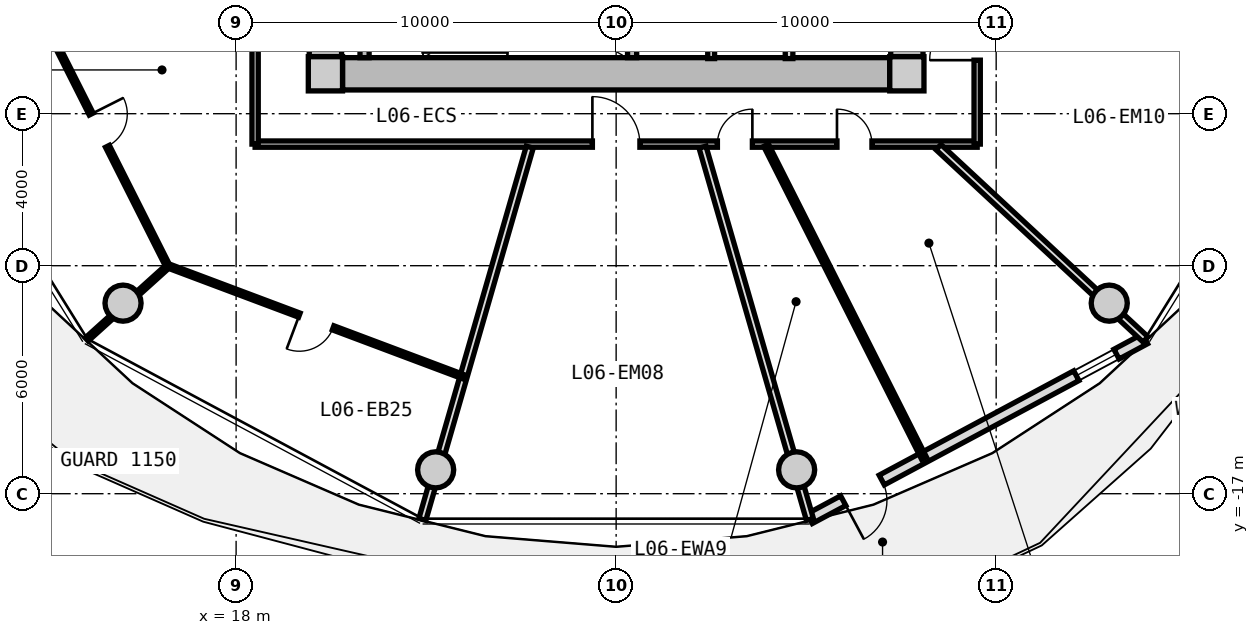
"""IFC4 building model, lengths in metres.
Left out: names, types, materials, properties, quantities, classifications, styles, units other than length and angle.
Written with IfcOpenShell. Run it as: python <this file> out.ifc"""

import sys

from ifc_helpers import new_model, si_unit, direction, frame, frame_2d, origin, origin_2d, place, context, subcontext, project, spatial, rectangle, circle, extrude, source, transform, mapped, element, fill, save


model = new_model("IFC4")
c1 = context("Model", 3, precision=1e-05, world=origin(), true_north=direction((0.0, 1.0)))
c2 = subcontext(c1, "Body", "Model", "MODEL_VIEW")
j1 = project(units=[si_unit("LENGTHUNIT", "METRE"), si_unit("PLANEANGLEUNIT", "RADIAN")], contexts=[c1])
p1 = place(None, origin())
s1 = spatial("IfcSite", under=j1, at=p1, CompositionType="ELEMENT")
p2 = place(p1, origin())
s2 = spatial("IfcBuilding", under=s1, at=p2, CompositionType="ELEMENT")
p3 = place(p2, frame((0.0, 0.0, 24.65)))
s3 = spatial("IfcBuildingStorey", under=s2, at=p3, CompositionType="ELEMENT", Elevation=24.65)
m1 = source(origin(), c2, "Body", "SweptSolid", [
    extrude(rectangle(XDim=0.9, YDim=0.9, at=origin_2d()), origin(), (0.0, 0.0, 1.0), 3.05),
])
for number, where, z_axis, x_axis in (
    (1, (20.35, -5.95, 0.0), (0.0, 0.0, 1.0), (1.0, 0.0, 0.0)),
    (2, (35.65, -5.95, 0.0), (0.0, 0.0, 1.0), (1.0, 0.0, 0.0)),
):
    element("IfcColumn", number, at=place(p3, frame(where, z_axis=z_axis, x_axis=x_axis)), inside=s3, PredefinedType="COLUMN", context=c2, shape_type="MappedRepresentation", body=[
        mapped(m1, transform((0.0, 0.0, 0.0), x_axis=(1.0, 0.0, 0.0), y_axis=(0.0, 1.0, 0.0), z_axis=(0.0, 0.0, 1.0), scale=1.0)),
    ])
m2 = source(origin(), c2, "Body", "SweptSolid", [
    extrude(rectangle(XDim=14.4, YDim=0.85, at=frame_2d((7.2, 0.0))), origin(), (0.0, 0.0, 1.0), 2.79),
])
p4 = place(p3, frame((35.2, -5.95, 0.0), z_axis=(0.0, 0.0, 1.0), x_axis=(-1.0, 0.0, 0.0)))
e3 = element("IfcWall", 3, at=p4, inside=s3, PredefinedType="SHEAR", context=c2, shape_type="MappedRepresentation", body=[
    mapped(m2, transform((0.0, 0.0, 0.0), x_axis=(1.0, 0.0, 0.0), y_axis=(0.0, 1.0, 0.0), z_axis=(0.0, 0.0, 1.0), scale=1.0)),
])
m3 = source(origin(), c2, "Body", "SweptSolid", [
    extrude(rectangle(XDim=11.0, YDim=0.85, at=frame_2d((5.5, 0.0))), origin(), (0.0, 0.0, 1.0), 2.79),
])
p5 = place(p3, frame((20.35, -5.5, 0.0), z_axis=(0.0, 0.0, 1.0), x_axis=(0.0, 1.0, 0.0)))
e4 = element("IfcWall", 4, at=p5, inside=s3, PredefinedType="SHEAR", context=c2, shape_type="MappedRepresentation", body=[
    mapped(m3, transform((0.0, 0.0, 0.0), x_axis=(1.0, 0.0, 0.0), y_axis=(0.0, 1.0, 0.0), z_axis=(0.0, 0.0, 1.0), scale=1.0)),
])
p6 = place(p5, frame((3.8, 0.0, 0.0)))
e5 = element("IfcOpeningElement", 5, at=p6, cuts=e4, PredefinedType="OPENING", context=c2, shape_type="SweptSolid", body=[
    extrude(rectangle(XDim=1.2, YDim=2.15, at=frame_2d((0.6, 1.075))), frame((0.0, 0.435, 0.0), z_axis=(0.0, -1.0, 0.0), x_axis=(1.0, 0.0, 0.0)), (0.0, 0.0, 1.0), 0.87),
])
p7 = place(p3, frame((35.65, 5.5, 0.0), z_axis=(0.0, 0.0, 1.0), x_axis=(0.0, -1.0, 0.0)))
e6 = element("IfcWall", 6, at=p7, inside=s3, PredefinedType="SHEAR", context=c2, shape_type="MappedRepresentation", body=[
    mapped(m3, transform((0.0, 0.0, 0.0), x_axis=(1.0, 0.0, 0.0), y_axis=(0.0, 1.0, 0.0), z_axis=(0.0, 0.0, 1.0), scale=1.0)),
])
p8 = place(p7, frame((5.65, 0.0, 0.0)))
e7 = element("IfcOpeningElement", 7, at=p8, cuts=e6, PredefinedType="OPENING", context=c2, shape_type="SweptSolid", body=[
    extrude(rectangle(XDim=1.2, YDim=2.15, at=frame_2d((0.6, 1.075))), frame((0.0, 0.435, 0.0), z_axis=(0.0, -1.0, 0.0), x_axis=(1.0, 0.0, 0.0)), (0.0, 0.0, 1.0), 0.87),
])
m4 = source(origin(), c2, "Body", "SweptSolid", [
    extrude(circle(Radius=0.475, at=origin_2d()), origin(), (0.0, 0.0, 1.0), 3.05),
])
for number, where, z_axis, x_axis in (
    (8, (15.025, -11.985, 0.0), (0.0, 0.0, 1.0), (1.0, 0.0, 0.0)),
    (9, (23.251, -16.373, 0.0), (0.0, 0.0, 1.0), (1.0, 0.0, 0.0)),
    (10, (32.749, -16.373, 0.0), (0.0, 0.0, 1.0), (1.0, 0.0, 0.0)),
    (11, (40.975, -11.985, 0.0), (0.0, 0.0, 1.0), (1.0, 0.0, 0.0)),
):
    element("IfcColumn", number, at=place(p3, frame(where, z_axis=z_axis, x_axis=x_axis)), inside=s3, PredefinedType="COLUMN", context=c2, shape_type="MappedRepresentation", body=[
        mapped(m4, transform((0.0, 0.0, 0.0), x_axis=(1.0, 0.0, 0.0), y_axis=(0.0, 1.0, 0.0), z_axis=(0.0, 0.0, 1.0), scale=1.0)),
    ])
m5 = source(origin(), c2, "Body", "SweptSolid", [
    extrude(rectangle(XDim=10.011, YDim=0.29, at=frame_2d((5.005, 0.0))), origin(), (0.0, 0.0, 1.0), 2.79),
])
p9 = place(p3, frame((41.916, -12.926, 0.0), z_axis=(0.0, 0.0, 1.0), x_axis=(-0.881272505317, -0.472608475773, 0.0)))
e12 = element("IfcWall", 12, at=p9, inside=s3, PredefinedType="SOLIDWALL", context=c2, shape_type="MappedRepresentation", body=[
    mapped(m5, transform((0.0, 0.0, 0.0), x_axis=(1.0, 0.0, 0.0), y_axis=(0.0, 1.0, 0.0), z_axis=(0.0, 0.0, 1.0), scale=1.0)),
])
p10 = place(p9, frame((7.86, 0.0, 0.0)))
e13 = element("IfcOpeningElement", 13, at=p10, cuts=e12, PredefinedType="OPENING", context=c2, shape_type="SweptSolid", body=[
    extrude(rectangle(XDim=1.15, YDim=2.25, at=frame_2d((0.575, 1.125))), frame((0.0, 0.155, 0.0), z_axis=(0.0, -1.0, 0.0), x_axis=(1.0, 0.0, 0.0)), (0.0, 0.0, 1.0), 0.31),
])
p11 = place(p9, frame((0.85, 0.0, 0.85)))
e14 = element("IfcOpeningElement", 14, at=p11, cuts=e12, PredefinedType="OPENING", context=c2, shape_type="SweptSolid", body=[
    extrude(rectangle(XDim=1.2, YDim=1.5, at=frame_2d((0.6, 0.75))), frame((0.0, 0.155, 0.0), z_axis=(0.0, -1.0, 0.0), x_axis=(1.0, 0.0, 0.0)), (0.0, 0.0, 1.0), 0.31),
])
m6 = source(origin(), c2, "Body", "SweptSolid", [
    extrude(rectangle(XDim=3.075, YDim=0.24, at=frame_2d((1.538, 0.0))), origin(), (0.0, 0.0, 1.0), 2.79),
])
for number, where, z_axis, x_axis in (
    (15, (21.38, -5.525, 0.0), (0.0, 0.0, 1.0), (0.0, 1.0, 0.0)),
    (16, (28.42, -5.525, 0.0), (0.0, 0.0, 1.0), (0.0, 1.0, 0.0)),
):
    element("IfcWall", number, at=place(p3, frame(where, z_axis=z_axis, x_axis=x_axis)), inside=s3, PredefinedType="PARTITIONING", context=c2, shape_type="MappedRepresentation", body=[
        mapped(m6, transform((0.0, 0.0, 0.0), x_axis=(1.0, 0.0, 0.0), y_axis=(0.0, 1.0, 0.0), z_axis=(0.0, 0.0, 1.0), scale=1.0)),
    ])
m7 = source(origin(), c2, "Body", "SweptSolid", [
    extrude(rectangle(XDim=3.8, YDim=0.2, at=frame_2d((1.9, 0.0))), origin(), (0.0, 0.0, 1.0), 2.775),
])
p12 = place(p3, frame((32.55, -5.55, 0.0), z_axis=(0.0, 0.0, 1.0), x_axis=(0.0, 1.0, 0.0)))
e17 = element("IfcWall", 17, at=p12, inside=s3, PredefinedType="PARTITIONING", context=c2, shape_type="MappedRepresentation", body=[
    mapped(m7, transform((0.0, 0.0, 0.0), x_axis=(1.0, 0.0, 0.0), y_axis=(0.0, 1.0, 0.0), z_axis=(0.0, 0.0, 1.0), scale=1.0)),
])
m8 = source(origin(), c2, "Body", "SweptSolid", [
    extrude(rectangle(XDim=3.22, YDim=0.18, at=frame_2d((1.61, 0.0))), origin(), (0.0, 0.0, 1.0), 2.775),
])
p13 = place(p3, frame((30.5, -5.55, 0.0), z_axis=(0.0, 0.0, 1.0), x_axis=(0.0, 1.0, 0.0)))
e18 = element("IfcWall", 18, at=p13, inside=s3, PredefinedType="PARTITIONING", context=c2, shape_type="MappedRepresentation", body=[
    mapped(m8, transform((0.0, 0.0, 0.0), x_axis=(1.0, 0.0, 0.0), y_axis=(0.0, 1.0, 0.0), z_axis=(0.0, 0.0, 1.0), scale=1.0)),
])
m9 = source(origin(), c2, "Body", "SweptSolid", [
    extrude(rectangle(XDim=19.0, YDim=0.165, at=frame_2d((9.5, 0.0))), origin(), (0.0, 0.0, 1.0), 2.775),
])
p14 = place(p3, frame((37.5, -7.8, 0.0), z_axis=(0.0, 0.0, 1.0), x_axis=(-1.0, 0.0, 0.0)))
e19 = element("IfcWall", 19, at=p14, inside=s3, PredefinedType="PARTITIONING", context=c2, shape_type="MappedRepresentation", body=[
    mapped(m9, transform((0.0, 0.0, 0.0), x_axis=(1.0, 0.0, 0.0), y_axis=(0.0, 1.0, 0.0), z_axis=(0.0, 0.0, 1.0), scale=1.0)),
])
p15 = place(p14, frame((8.875, 0.0, 0.0)))
e20 = element("IfcOpeningElement", 20, at=p15, cuts=e19, PredefinedType="OPENING", context=c2, shape_type="SweptSolid", body=[
    extrude(rectangle(XDim=1.25, YDim=2.2, at=frame_2d((0.625, 1.1))), frame((0.0, 0.093, 0.0), z_axis=(0.0, -1.0, 0.0), x_axis=(1.0, 0.0, 0.0)), (0.0, 0.0, 1.0), 0.185),
])
p16 = place(p14, frame((5.915, 0.0, 0.0)))
e21 = element("IfcOpeningElement", 21, at=p16, cuts=e19, PredefinedType="OPENING", context=c2, shape_type="SweptSolid", body=[
    extrude(rectangle(XDim=0.92, YDim=2.1, at=frame_2d((0.46, 1.05))), frame((0.0, 0.093, 0.0), z_axis=(0.0, -1.0, 0.0), x_axis=(1.0, 0.0, 0.0)), (0.0, 0.0, 1.0), 0.185),
])
p17 = place(p14, frame((2.769, 0.0, 0.0)))
e22 = element("IfcOpeningElement", 22, at=p17, cuts=e19, PredefinedType="OPENING", context=c2, shape_type="SweptSolid", body=[
    extrude(rectangle(XDim=0.92, YDim=2.1, at=frame_2d((0.46, 1.05))), frame((0.0, 0.093, 0.0), z_axis=(0.0, -1.0, 0.0), x_axis=(1.0, 0.0, 0.0)), (0.0, 0.0, 1.0), 0.185),
])
m10 = source(origin(), c2, "Body", "SweptSolid", [
    extrude(rectangle(XDim=15.6, YDim=0.165, at=frame_2d((7.8, 0.0))), origin(), (0.0, 0.0, 1.0), 2.775),
])
p18 = place(p3, frame((18.5, -7.8, 0.0), z_axis=(0.0, 0.0, 1.0), x_axis=(0.0, 1.0, 0.0)))
e23 = element("IfcWall", 23, at=p18, inside=s3, PredefinedType="PARTITIONING", context=c2, shape_type="MappedRepresentation", body=[
    mapped(m10, transform((0.0, 0.0, 0.0), x_axis=(1.0, 0.0, 0.0), y_axis=(0.0, 1.0, 0.0), z_axis=(0.0, 0.0, 1.0), scale=1.0)),
])
p19 = place(p18, frame((12.241, 0.0, 0.0)))
e24 = element("IfcOpeningElement", 24, at=p19, cuts=e23, PredefinedType="OPENING", context=c2, shape_type="SweptSolid", body=[
    extrude(rectangle(XDim=1.05, YDim=2.15, at=frame_2d((0.525, 1.075))), frame((0.0, 0.093, 0.0), z_axis=(0.0, -1.0, 0.0), x_axis=(1.0, 0.0, 0.0)), (0.0, 0.0, 1.0), 0.185),
])
p20 = place(p18, frame((3.63, 0.0, 0.0)))
e25 = element("IfcOpeningElement", 25, at=p20, cuts=e23, PredefinedType="OPENING", context=c2, shape_type="SweptSolid", body=[
    extrude(rectangle(XDim=1.05, YDim=2.15, at=frame_2d((0.525, 1.075))), frame((0.0, 0.093, 0.0), z_axis=(0.0, -1.0, 0.0), x_axis=(1.0, 0.0, 0.0)), (0.0, 0.0, 1.0), 0.185),
])
p21 = place(p3, frame((37.5, 7.8, 0.0), z_axis=(0.0, 0.0, 1.0), x_axis=(0.0, -1.0, 0.0)))
e26 = element("IfcWall", 26, at=p21, inside=s3, PredefinedType="PARTITIONING", context=c2, shape_type="MappedRepresentation", body=[
    mapped(m10, transform((0.0, 0.0, 0.0), x_axis=(1.0, 0.0, 0.0), y_axis=(0.0, 1.0, 0.0), z_axis=(0.0, 0.0, 1.0), scale=1.0)),
])
p22 = place(p21, frame((12.141, 0.0, 0.0)))
e27 = element("IfcOpeningElement", 27, at=p22, cuts=e26, PredefinedType="OPENING", context=c2, shape_type="SweptSolid", body=[
    extrude(rectangle(XDim=1.25, YDim=2.2, at=frame_2d((0.625, 1.1))), frame((0.0, 0.093, 0.0), z_axis=(0.0, -1.0, 0.0), x_axis=(1.0, 0.0, 0.0)), (0.0, 0.0, 1.0), 0.185),
])
p23 = place(p21, frame((6.196, 0.0, 0.0)))
e28 = element("IfcOpeningElement", 28, at=p23, cuts=e26, PredefinedType="OPENING", context=c2, shape_type="SweptSolid", body=[
    extrude(rectangle(XDim=1.05, YDim=2.15, at=frame_2d((0.525, 1.075))), frame((0.0, 0.093, 0.0), z_axis=(0.0, -1.0, 0.0), x_axis=(1.0, 0.0, 0.0)), (0.0, 0.0, 1.0), 0.185),
])
p24 = place(p21, frame((1.092, 0.0, 0.0)))
e29 = element("IfcOpeningElement", 29, at=p24, cuts=e26, PredefinedType="OPENING", context=c2, shape_type="SweptSolid", body=[
    extrude(rectangle(XDim=1.05, YDim=2.15, at=frame_2d((0.525, 1.075))), frame((0.0, 0.093, 0.0), z_axis=(0.0, -1.0, 0.0), x_axis=(1.0, 0.0, 0.0)), (0.0, 0.0, 1.0), 0.185),
])
m11 = source(origin(), c2, "Body", "SweptSolid", [
    extrude(rectangle(XDim=10.196, YDim=0.19, at=frame_2d((5.098, 0.0))), origin(), (0.0, 0.0, 1.0), 2.225),
])
p25 = place(p3, frame((25.727, -7.88, 0.0), z_axis=(0.0, 0.0, 1.0), x_axis=(-0.277136420347, -0.960830580549, 0.0)))
e30 = element("IfcWall", 30, at=p25, inside=s3, PredefinedType="PARTITIONING", context=c2, shape_type="MappedRepresentation", body=[
    mapped(m11, transform((0.0, 0.0, 0.0), x_axis=(1.0, 0.0, 0.0), y_axis=(0.0, 1.0, 0.0), z_axis=(0.0, 0.0, 1.0), scale=1.0)),
])
m12 = source(origin(), c2, "Body", "SweptSolid", [
    extrude(rectangle(XDim=8.018, YDim=0.115, at=frame_2d((4.009, 0.0))), origin(), (0.0, 0.0, 1.0), 2.775),
])
p26 = place(p3, frame((12.596, -3.854, 0.0), z_axis=(0.0, 0.0, 1.0), x_axis=(0.450134355233, -0.89296084026, 0.0)))
e31 = element("IfcWall", 31, at=p26, inside=s3, PredefinedType="PARTITIONING", context=c2, shape_type="MappedRepresentation", body=[
    mapped(m12, transform((0.0, 0.0, 0.0), x_axis=(1.0, 0.0, 0.0), y_axis=(0.0, 1.0, 0.0), z_axis=(0.0, 0.0, 1.0), scale=1.0)),
])
p27 = place(p26, frame((3.534, 0.0, 0.0)))
e32 = element("IfcOpeningElement", 32, at=p27, cuts=e31, PredefinedType="OPENING", context=c2, shape_type="SweptSolid", body=[
    extrude(rectangle(XDim=0.95, YDim=2.1, at=frame_2d((0.475, 1.05))), frame((0.0, 0.067, 0.0), z_axis=(0.0, -1.0, 0.0), x_axis=(1.0, 0.0, 0.0)), (0.0, 0.0, 1.0), 0.135),
])
m13 = source(origin(), c2, "Body", "SweptSolid", [
    extrude(rectangle(XDim=8.32, YDim=0.115, at=frame_2d((4.16, 0.0))), origin(), (0.0, 0.0, 1.0), 2.775),
])
p28 = place(p3, frame((16.214, -11.006, 0.0), z_axis=(0.0, 0.0, 1.0), x_axis=(0.936180763098, -0.351518959382, 0.0)))
e33 = element("IfcWall", 33, at=p28, inside=s3, PredefinedType="PARTITIONING", context=c2, shape_type="MappedRepresentation", body=[
    mapped(m13, transform((0.0, 0.0, 0.0), x_axis=(1.0, 0.0, 0.0), y_axis=(0.0, 1.0, 0.0), z_axis=(0.0, 0.0, 1.0), scale=1.0)),
])
p29 = place(p28, frame((3.685, 0.0, 0.0)))
e34 = element("IfcOpeningElement", 34, at=p29, cuts=e33, PredefinedType="OPENING", context=c2, shape_type="SweptSolid", body=[
    extrude(rectangle(XDim=0.95, YDim=2.1, at=frame_2d((0.475, 1.05))), frame((0.0, 0.067, 0.0), z_axis=(0.0, -1.0, 0.0), x_axis=(1.0, 0.0, 0.0)), (0.0, 0.0, 1.0), 0.135),
])
m14 = source(origin(), c2, "Body", "SweptSolid", [
    extrude(rectangle(XDim=2.887, YDim=0.115, at=frame_2d((1.444, 0.0))), origin(), (0.0, 0.0, 1.0), 2.225),
])
p30 = place(p3, frame((16.214, -11.006, 0.0), z_axis=(0.0, 0.0, 1.0), x_axis=(-0.742448503307, -0.669903142205, 0.0)))
e35 = element("IfcWall", 35, at=p30, inside=s3, PredefinedType="PARTITIONING", context=c2, shape_type="MappedRepresentation", body=[
    mapped(m14, transform((0.0, 0.0, 0.0), x_axis=(1.0, 0.0, 0.0), y_axis=(0.0, 1.0, 0.0), z_axis=(0.0, 0.0, 1.0), scale=1.0)),
])
p31 = place(p3, frame((30.273, -7.88, 0.0), z_axis=(0.0, 0.0, 1.0), x_axis=(0.277136420347, -0.960830580549, 0.0)))
e36 = element("IfcWall", 36, at=p31, inside=s3, PredefinedType="PARTITIONING", context=c2, shape_type="MappedRepresentation", body=[
    mapped(m11, transform((0.0, 0.0, 0.0), x_axis=(1.0, 0.0, 0.0), y_axis=(0.0, 1.0, 0.0), z_axis=(0.0, 0.0, 1.0), scale=1.0)),
])
m15 = source(origin(), c2, "Body", "SweptSolid", [
    extrude(rectangle(XDim=7.435, YDim=0.19, at=frame_2d((3.717, 0.0))), origin(), (0.0, 0.0, 1.0), 2.225),
])
p32 = place(p3, frame((36.483, -7.88, 0.0), z_axis=(0.0, 0.0, 1.0), x_axis=(0.732651956848, -0.680603489652, 0.0)))
e37 = element("IfcWall", 37, at=p32, inside=s3, PredefinedType="PARTITIONING", context=c2, shape_type="MappedRepresentation", body=[
    mapped(m15, transform((0.0, 0.0, 0.0), x_axis=(1.0, 0.0, 0.0), y_axis=(0.0, 1.0, 0.0), z_axis=(0.0, 0.0, 1.0), scale=1.0)),
])
m16 = source(origin(), c2, "Body", "SweptSolid", [
    extrude(rectangle(XDim=9.225, YDim=0.14, at=frame_2d((4.613, 0.0))), origin(), (0.0, 0.0, 1.0), 2.775),
])
p33 = place(p3, frame((31.946, -7.83, 0.0), z_axis=(0.0, 0.0, 1.0), x_axis=(0.450460543767, -0.892796336523, 0.0)))
e38 = element("IfcWall", 38, at=p33, inside=s3, PredefinedType="PARTITIONING", context=c2, shape_type="MappedRepresentation", body=[
    mapped(m16, transform((0.0, 0.0, 0.0), x_axis=(1.0, 0.0, 0.0), y_axis=(0.0, 1.0, 0.0), z_axis=(0.0, 0.0, 1.0), scale=1.0)),
])
m17 = source(origin(), c2, "Body", "SweptSolid", [
    extrude(rectangle(XDim=1.15, YDim=2.25, at=frame_2d((0.575, 1.125))), frame((0.0, 0.025, 0.0), z_axis=(0.0, -1.0, 0.0), x_axis=(1.0, 0.0, 0.0)), (0.0, 0.0, 1.0), 0.05),
])
p34 = place(p10, origin())
e39 = element("IfcDoor", 39, at=p34, inside=s3, OperationType="SINGLE_SWING_RIGHT", PredefinedType="DOOR", context=c2, shape_type="MappedRepresentation", body=[
    mapped(m17, transform((0.0, 0.0, 0.0), x_axis=(1.0, 0.0, 0.0), y_axis=(0.0, 1.0, 0.0), z_axis=(0.0, 0.0, 1.0), scale=1.0)),
])
fill(e13, e39)
m18 = source(origin(), c2, "Body", "SweptSolid", [
    extrude(rectangle(XDim=1.2, YDim=1.5, at=frame_2d((0.6, 0.75))), frame((0.0, 0.03, 0.0), z_axis=(0.0, -1.0, 0.0), x_axis=(1.0, 0.0, 0.0)), (0.0, 0.0, 1.0), 0.06),
])
p35 = place(p11, origin())
e40 = element("IfcWindow", 40, at=p35, inside=s3, PartitioningType="SINGLE_PANEL", PredefinedType="WINDOW", context=c2, shape_type="MappedRepresentation", body=[
    mapped(m18, transform((0.0, 0.0, 0.0), x_axis=(1.0, 0.0, 0.0), y_axis=(0.0, 1.0, 0.0), z_axis=(0.0, 0.0, 1.0), scale=1.0)),
])
fill(e14, e40)
m19 = source(origin(), c2, "Body", "SweptSolid", [
    extrude(rectangle(XDim=0.95, YDim=2.1, at=frame_2d((0.475, 1.05))), frame((0.0, 0.025, 0.0), z_axis=(0.0, -1.0, 0.0), x_axis=(1.0, 0.0, 0.0)), (0.0, 0.0, 1.0), 0.05),
])
p36 = place(p27, origin())
e41 = element("IfcDoor", 41, at=p36, inside=s3, OperationType="SINGLE_SWING_LEFT", PredefinedType="DOOR", context=c2, shape_type="MappedRepresentation", body=[
    mapped(m19, transform((0.0, 0.0, 0.0), x_axis=(1.0, 0.0, 0.0), y_axis=(0.0, 1.0, 0.0), z_axis=(0.0, 0.0, 1.0), scale=1.0)),
])
fill(e32, e41)
p37 = place(p29, frame((0.95, 0.0, 0.0), z_axis=(0.0, 0.0, 1.0), x_axis=(-1.0, 0.0, 0.0)))
e42 = element("IfcDoor", 42, at=p37, inside=s3, OperationType="SINGLE_SWING_RIGHT", PredefinedType="DOOR", context=c2, shape_type="MappedRepresentation", body=[
    mapped(m19, transform((0.0, 0.0, 0.0), x_axis=(1.0, 0.0, 0.0), y_axis=(0.0, 1.0, 0.0), z_axis=(0.0, 0.0, 1.0), scale=1.0)),
])
fill(e34, e42)
m20 = source(origin(), c2, "Body", "SweptSolid", [
    extrude(rectangle(XDim=1.25, YDim=2.2, at=frame_2d((0.625, 1.1))), frame((0.0, 0.025, 0.0), z_axis=(0.0, -1.0, 0.0), x_axis=(1.0, 0.0, 0.0)), (0.0, 0.0, 1.0), 0.05),
])
p38 = place(p15, frame((1.25, 0.0, 0.0), z_axis=(0.0, 0.0, 1.0), x_axis=(-1.0, 0.0, 0.0)))
e43 = element("IfcDoor", 43, at=p38, inside=s3, OperationType="SINGLE_SWING_LEFT", PredefinedType="DOOR", context=c2, shape_type="MappedRepresentation", body=[
    mapped(m20, transform((0.0, 0.0, 0.0), x_axis=(1.0, 0.0, 0.0), y_axis=(0.0, 1.0, 0.0), z_axis=(0.0, 0.0, 1.0), scale=1.0)),
])
fill(e20, e43)
m21 = source(origin(), c2, "Body", "SweptSolid", [
    extrude(rectangle(XDim=0.92, YDim=2.1, at=frame_2d((0.46, 1.05))), frame((0.0, 0.025, 0.0), z_axis=(0.0, -1.0, 0.0), x_axis=(1.0, 0.0, 0.0)), (0.0, 0.0, 1.0), 0.05),
])
p39 = place(p16, frame((0.92, 0.0, 0.0), z_axis=(0.0, 0.0, 1.0), x_axis=(-1.0, 0.0, 0.0)))
e44 = element("IfcDoor", 44, at=p39, inside=s3, OperationType="SINGLE_SWING_RIGHT", PredefinedType="DOOR", context=c2, shape_type="MappedRepresentation", body=[
    mapped(m21, transform((0.0, 0.0, 0.0), x_axis=(1.0, 0.0, 0.0), y_axis=(0.0, 1.0, 0.0), z_axis=(0.0, 0.0, 1.0), scale=1.0)),
])
fill(e21, e44)
p40 = place(p17, frame((0.92, 0.0, 0.0), z_axis=(0.0, 0.0, 1.0), x_axis=(-1.0, 0.0, 0.0)))
e45 = element("IfcDoor", 45, at=p40, inside=s3, OperationType="SINGLE_SWING_LEFT", PredefinedType="DOOR", context=c2, shape_type="MappedRepresentation", body=[
    mapped(m21, transform((0.0, 0.0, 0.0), x_axis=(1.0, 0.0, 0.0), y_axis=(0.0, 1.0, 0.0), z_axis=(0.0, 0.0, 1.0), scale=1.0)),
])
fill(e22, e45)
p41 = place(p22, frame((1.25, 0.0, 0.0), z_axis=(0.0, 0.0, 1.0), x_axis=(-1.0, 0.0, 0.0)))
e46 = element("IfcDoor", 46, at=p41, inside=s3, OperationType="SINGLE_SWING_LEFT", PredefinedType="DOOR", context=c2, shape_type="MappedRepresentation", body=[
    mapped(m20, transform((0.0, 0.0, 0.0), x_axis=(1.0, 0.0, 0.0), y_axis=(0.0, 1.0, 0.0), z_axis=(0.0, 0.0, 1.0), scale=1.0)),
])
fill(e27, e46)
save(model, sys.argv[1])
